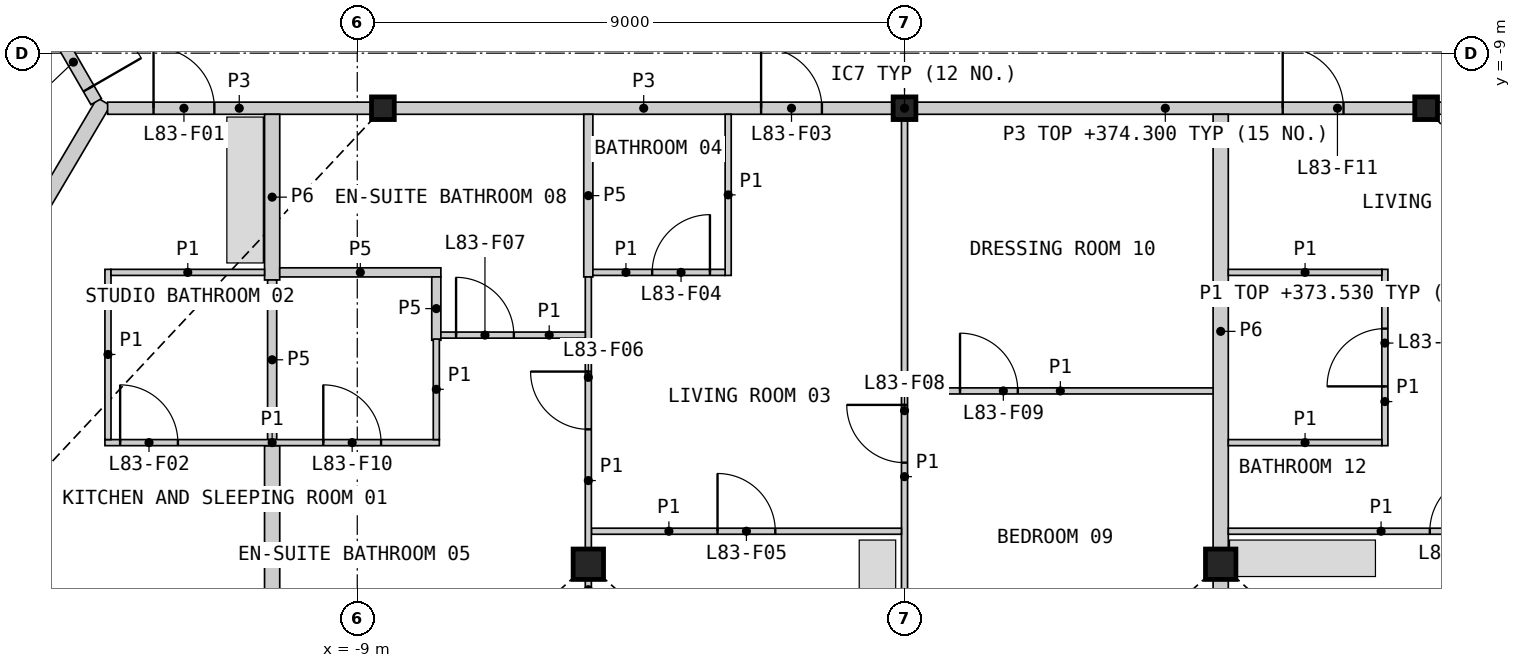
"""IFC4 building model, lengths in metres.
Left out: names, types, materials, properties, quantities, classifications, styles, units other than length and angle.
Written with IfcOpenShell. Run it as: python <this file> out.ifc"""

import sys

from ifc_helpers import new_model, si_unit, direction, frame, frame_2d, origin, origin_2d, place, context, subcontext, project, spatial, rectangle, hollow_rectangle, i_section, extrude, element, fill, save


model = new_model("IFC4")
c1 = context("Model", 3, precision=1e-05, world=origin(), true_north=direction((0.0, 1.0)))
c2 = subcontext(c1, "Body", "Model", "MODEL_VIEW")
j1 = project(units=[si_unit("LENGTHUNIT", "METRE"), si_unit("PLANEANGLEUNIT", "RADIAN")], contexts=[c1])
p1 = place(None, origin())
s1 = spatial("IfcSite", under=j1, at=p1, CompositionType="ELEMENT")
p2 = place(p1, origin())
s2 = spatial("IfcBuilding", under=s1, at=p2, CompositionType="ELEMENT")
p3 = place(p2, frame((0.0, 0.0, 371.2)))
s3 = spatial("IfcBuildingStorey", under=s2, at=p3, CompositionType="ELEMENT", Elevation=371.2)
for number, where, z_axis, x_axis in (
    (1, (-5.2, -17.406, 0.0), (0.0, 0.0, 1.0), (1.0, 0.0, 0.0)),
    (2, (5.2, -17.406, 0.0), (0.0, 0.0, 1.0), (1.0, 0.0, 0.0)),
):
    element("IfcColumn", number, at=place(p3, frame(where, z_axis=z_axis, x_axis=x_axis)), inside=s3, PredefinedType="COLUMN", context=c2, shape_type="SweptSolid", body=[
        extrude(hollow_rectangle(XDim=0.5, YDim=0.5, WallThickness=0.03, at=origin_2d()), origin(), (0.0, 0.0, 1.0), 3.4),
    ])
for number, where, z_axis, x_axis in (
    (3, (-8.578, -9.906, 0.0), (0.0, 0.0, 1.0), (1.0, 0.0, 0.0)),
    (4, (0.0, -9.906, 0.0), (0.0, 0.0, 1.0), (1.0, 0.0, 0.0)),
    (5, (8.578, -9.906, 0.0), (0.0, 0.0, 1.0), (1.0, 0.0, 0.0)),
):
    element("IfcColumn", number, at=place(p3, frame(where, z_axis=z_axis, x_axis=x_axis)), inside=s3, PredefinedType="COLUMN", context=c2, shape_type="SweptSolid", body=[
        extrude(i_section(OverallWidth=0.374, OverallDepth=0.372, WebThickness=0.016, FlangeThickness=0.026, at=origin_2d()), origin(), (0.0, 0.0, 1.0), 3.4),
    ])
p4 = place(p3, frame((-20.351, -21.956, 0.0), z_axis=(0.0, 0.0, 1.0), x_axis=(0.508713003719, 0.860936164793, 0.0)))
e6 = element("IfcWall", 6, at=p4, inside=s3, PredefinedType="PARTITIONING", context=c2, shape_type="SweptSolid", body=[
    extrude(rectangle(XDim=14.122, YDim=0.25, at=frame_2d((7.061, 0.0))), origin(), (0.0, 0.0, 1.0), 2.33),
])
p5 = place(p3, frame((0.197, -9.906, 0.0), z_axis=(0.0, 0.0, 1.0), x_axis=(1.0, 0.0, 0.0)))
e7 = element("IfcWall", 7, at=p5, inside=s3, PredefinedType="PARTITIONING", context=c2, shape_type="SweptSolid", body=[
    extrude(rectangle(XDim=8.185, YDim=0.2, at=frame_2d((4.092, 0.0))), origin(), (0.0, 0.0, 1.0), 3.1),
])
p6 = place(p5, frame((6.023, 0.0, 0.0)))
e8 = element("IfcOpeningElement", 8, at=p6, cuts=e7, PredefinedType="OPENING", context=c2, shape_type="SweptSolid", body=[
    extrude(rectangle(XDim=1.0, YDim=2.1, at=frame_2d((0.5, 1.05))), frame((0.0, 0.11, 0.0), z_axis=(0.0, -1.0, 0.0), x_axis=(1.0, 0.0, 0.0)), (0.0, 0.0, 1.0), 0.22),
])
p7 = place(p3, frame((-8.382, -9.906, 0.0), z_axis=(0.0, 0.0, 1.0), x_axis=(1.0, 0.0, 0.0)))
e9 = element("IfcWall", 9, at=p7, inside=s3, PredefinedType="PARTITIONING", context=c2, shape_type="SweptSolid", body=[
    extrude(rectangle(XDim=8.185, YDim=0.2, at=frame_2d((4.092, 0.0))), origin(), (0.0, 0.0, 1.0), 3.1),
])
p8 = place(p7, frame((6.023, 0.0, 0.0)))
e10 = element("IfcOpeningElement", 10, at=p8, cuts=e9, PredefinedType="OPENING", context=c2, shape_type="SweptSolid", body=[
    extrude(rectangle(XDim=1.0, YDim=2.1, at=frame_2d((0.5, 1.05))), frame((0.0, 0.11, 0.0), z_axis=(0.0, -1.0, 0.0), x_axis=(1.0, 0.0, 0.0)), (0.0, 0.0, 1.0), 0.22),
])
p9 = place(p3, frame((5.2, -17.146, 0.0), z_axis=(0.0, 0.0, 1.0), x_axis=(0.0, 1.0, 0.0)))
e11 = element("IfcWall", 11, at=p9, inside=s3, PredefinedType="PARTITIONING", context=c2, shape_type="SweptSolid", body=[
    extrude(rectangle(XDim=7.14, YDim=0.25, at=frame_2d((3.57, 0.0))), origin(), (0.0, 0.0, 1.0), 2.33),
])
p10 = place(p3, frame((-10.4, -21.828, 0.0), z_axis=(0.0, 0.0, 1.0), x_axis=(0.0, 1.0, 0.0)))
e12 = element("IfcWall", 12, at=p10, inside=s3, PredefinedType="PARTITIONING", context=c2, shape_type="SweptSolid", body=[
    extrude(rectangle(XDim=6.372, YDim=0.25, at=frame_2d((3.186, 0.0))), origin(), (0.0, 0.0, 1.0), 2.33),
])
p11 = place(p3, frame((-13.106, -9.906, 0.0), z_axis=(0.0, 0.0, 1.0), x_axis=(1.0, 0.0, 0.0)))
e13 = element("IfcWall", 13, at=p11, inside=s3, PredefinedType="PARTITIONING", context=c2, shape_type="SweptSolid", body=[
    extrude(rectangle(XDim=4.331, YDim=0.2, at=frame_2d((2.165, 0.0))), origin(), (0.0, 0.0, 1.0), 3.1),
])
p12 = place(p11, frame((0.755, 0.0, 0.0)))
e14 = element("IfcOpeningElement", 14, at=p12, cuts=e13, PredefinedType="OPENING", context=c2, shape_type="SweptSolid", body=[
    extrude(rectangle(XDim=1.0, YDim=2.1, at=frame_2d((0.5, 1.05))), frame((0.0, 0.11, 0.0), z_axis=(0.0, -1.0, 0.0), x_axis=(1.0, 0.0, 0.0)), (0.0, 0.0, 1.0), 0.22),
])
p13 = place(p3, frame((8.775, -9.906, 0.0), z_axis=(0.0, 0.0, 1.0), x_axis=(1.0, 0.0, 0.0)))
e15 = element("IfcWall", 15, at=p13, inside=s3, PredefinedType="PARTITIONING", context=c2, shape_type="SweptSolid", body=[
    extrude(rectangle(XDim=4.331, YDim=0.2, at=frame_2d((2.165, 0.0))), origin(), (0.0, 0.0, 1.0), 3.1),
])
p14 = place(p3, frame((-15.131, -6.614, 0.0), z_axis=(0.0, 0.0, 1.0), x_axis=(0.499967746641, -0.866044024469, 0.0)))
e16 = element("IfcWall", 16, at=p14, inside=s3, PredefinedType="PARTITIONING", context=c2, shape_type="SweptSolid", body=[
    extrude(rectangle(XDim=3.676, YDim=0.2, at=frame_2d((1.838, 0.0))), origin(), (0.0, 0.0, 1.0), 3.1),
])
p15 = place(p14, frame((2.426, 0.0, 0.0)))
e17 = element("IfcOpeningElement", 17, at=p15, cuts=e16, PredefinedType="OPENING", context=c2, shape_type="SweptSolid", body=[
    extrude(rectangle(XDim=1.0, YDim=2.1, at=frame_2d((0.5, 1.05))), frame((0.0, 0.11, 0.0), z_axis=(0.0, -1.0, 0.0), x_axis=(1.0, 0.0, 0.0)), (0.0, 0.0, 1.0), 0.22),
])
p16 = place(p3, frame((-10.4, -12.731, 0.0), z_axis=(0.0, 0.0, 1.0), x_axis=(0.0, 1.0, 0.0)))
e18 = element("IfcWall", 18, at=p16, inside=s3, PredefinedType="PARTITIONING", context=c2, shape_type="SweptSolid", body=[
    extrude(rectangle(XDim=2.725, YDim=0.25, at=frame_2d((1.363, 0.0))), origin(), (0.0, 0.0, 1.0), 2.33),
])
p17 = place(p3, frame((5.2, -17.983, 0.0), z_axis=(0.0, 0.0, 1.0), x_axis=(0.0, 1.0, 0.0)))
e19 = element("IfcWall", 19, at=p17, inside=s3, PredefinedType="PARTITIONING", context=c2, shape_type="SweptSolid", body=[
    extrude(rectangle(XDim=0.318, YDim=0.25, at=frame_2d((0.159, 0.0))), origin(), (0.0, 0.0, 1.0), 2.33),
])
p18 = place(p3, frame((-10.4, -15.356, 0.0), z_axis=(0.0, 0.0, 1.0), x_axis=(0.0, 1.0, 0.0)))
e20 = element("IfcWall", 20, at=p18, inside=s3, PredefinedType="PLUMBINGWALL", context=c2, shape_type="SweptSolid", body=[
    extrude(rectangle(XDim=2.625, YDim=0.15, at=frame_2d((1.312, 0.0))), origin(), (0.0, 0.0, 1.0), 2.33),
])
p19 = place(p3, frame((-5.2, -12.681, 0.0), z_axis=(0.0, 0.0, 1.0), x_axis=(0.0, 1.0, 0.0)))
e21 = element("IfcWall", 21, at=p19, inside=s3, PredefinedType="PLUMBINGWALL", context=c2, shape_type="SweptSolid", body=[
    extrude(rectangle(XDim=2.675, YDim=0.15, at=frame_2d((1.337, 0.0))), origin(), (0.0, 0.0, 1.0), 2.33),
])
p20 = place(p3, frame((-10.275, -12.606, 0.0), z_axis=(0.0, 0.0, 1.0), x_axis=(1.0, 0.0, 0.0)))
e22 = element("IfcWall", 22, at=p20, inside=s3, PredefinedType="PLUMBINGWALL", context=c2, shape_type="SweptSolid", body=[
    extrude(rectangle(XDim=2.65, YDim=0.15, at=frame_2d((1.325, 0.0))), origin(), (0.0, 0.0, 1.0), 2.33),
])
p21 = place(p3, frame((-7.7, -13.722, 0.0), z_axis=(0.0, 0.0, 1.0), x_axis=(0.0, 1.0, 0.0)))
e23 = element("IfcWall", 23, at=p21, inside=s3, PredefinedType="PLUMBINGWALL", context=c2, shape_type="SweptSolid", body=[
    extrude(rectangle(XDim=1.042, YDim=0.15, at=frame_2d((0.521, 0.0))), origin(), (0.0, 0.0, 1.0), 2.33),
])
p22 = place(p3, frame((0.0, -21.828, 0.0), z_axis=(0.0, 0.0, 1.0), x_axis=(0.0, 1.0, 0.0)))
e24 = element("IfcWall", 24, at=p22, inside=s3, PredefinedType="PARTITIONING", context=c2, shape_type="SweptSolid", body=[
    extrude(rectangle(XDim=11.725, YDim=0.1, at=frame_2d((5.863, 0.0))), origin(), (0.0, 0.0, 1.0), 2.33),
])
p23 = place(p22, frame((6.093, 0.0, 0.0)))
e25 = element("IfcOpeningElement", 25, at=p23, cuts=e24, PredefinedType="OPENING", context=c2, shape_type="SweptSolid", body=[
    extrude(rectangle(XDim=0.95, YDim=2.1, at=frame_2d((0.475, 1.05))), frame((0.0, 0.06, 0.0), z_axis=(0.0, -1.0, 0.0), x_axis=(1.0, 0.0, 0.0)), (0.0, 0.0, 1.0), 0.12),
])
p24 = place(p3, frame((-13.15, -15.406, 0.0), z_axis=(0.0, 0.0, 1.0), x_axis=(1.0, 0.0, 0.0)))
e26 = element("IfcWall", 26, at=p24, inside=s3, PredefinedType="PARTITIONING", context=c2, shape_type="SweptSolid", body=[
    extrude(rectangle(XDim=5.5, YDim=0.1, at=frame_2d((2.75, 0.0))), origin(), (0.0, 0.0, 1.0), 2.33),
])
p25 = place(p24, frame((0.25, 0.0, 0.0)))
e27 = element("IfcOpeningElement", 27, at=p25, cuts=e26, PredefinedType="OPENING", context=c2, shape_type="SweptSolid", body=[
    extrude(rectangle(XDim=0.95, YDim=2.1, at=frame_2d((0.475, 1.05))), frame((0.0, 0.06, 0.0), z_axis=(0.0, -1.0, 0.0), x_axis=(1.0, 0.0, 0.0)), (0.0, 0.0, 1.0), 0.12),
])
p26 = place(p24, frame((3.591, 0.0, 0.0)))
e28 = element("IfcOpeningElement", 28, at=p26, cuts=e26, PredefinedType="OPENING", context=c2, shape_type="SweptSolid", body=[
    extrude(rectangle(XDim=0.95, YDim=2.1, at=frame_2d((0.475, 1.05))), frame((0.0, 0.06, 0.0), z_axis=(0.0, -1.0, 0.0), x_axis=(1.0, 0.0, 0.0)), (0.0, 0.0, 1.0), 0.12),
])
p27 = place(p3, frame((-5.15, -16.863, 0.0), z_axis=(0.0, 0.0, 1.0), x_axis=(1.0, 0.0, 0.0)))
e29 = element("IfcWall", 29, at=p27, inside=s3, PredefinedType="PARTITIONING", context=c2, shape_type="SweptSolid", body=[
    extrude(rectangle(XDim=5.1, YDim=0.1, at=frame_2d((2.55, 0.0))), origin(), (0.0, 0.0, 1.0), 2.33),
])
p28 = place(p27, frame((2.075, 0.0, 0.0)))
e30 = element("IfcOpeningElement", 30, at=p28, cuts=e29, PredefinedType="OPENING", context=c2, shape_type="SweptSolid", body=[
    extrude(rectangle(XDim=0.95, YDim=2.1, at=frame_2d((0.475, 1.05))), frame((0.0, 0.06, 0.0), z_axis=(0.0, -1.0, 0.0), x_axis=(1.0, 0.0, 0.0)), (0.0, 0.0, 1.0), 0.12),
])
p29 = place(p3, frame((5.325, -16.863, 0.0), z_axis=(0.0, 0.0, 1.0), x_axis=(1.0, 0.0, 0.0)))
e31 = element("IfcWall", 31, at=p29, inside=s3, PredefinedType="PARTITIONING", context=c2, shape_type="SweptSolid", body=[
    extrude(rectangle(XDim=5.025, YDim=0.1, at=frame_2d((2.513, 0.0))), origin(), (0.0, 0.0, 1.0), 2.33),
])
p30 = place(p29, frame((3.314, 0.0, 0.0)))
e32 = element("IfcOpeningElement", 32, at=p30, cuts=e31, PredefinedType="OPENING", context=c2, shape_type="SweptSolid", body=[
    extrude(rectangle(XDim=0.95, YDim=2.1, at=frame_2d((0.475, 1.05))), frame((0.0, 0.06, 0.0), z_axis=(0.0, -1.0, 0.0), x_axis=(1.0, 0.0, 0.0)), (0.0, 0.0, 1.0), 0.12),
])
p31 = place(p3, frame((0.05, -14.555, 0.0), z_axis=(0.0, 0.0, 1.0), x_axis=(1.0, 0.0, 0.0)))
e33 = element("IfcWall", 33, at=p31, inside=s3, PredefinedType="PARTITIONING", context=c2, shape_type="SweptSolid", body=[
    extrude(rectangle(XDim=5.025, YDim=0.1, at=frame_2d((2.512, 0.0))), origin(), (0.0, 0.0, 1.0), 2.33),
])
p32 = place(p31, frame((0.863, 0.0, 0.0)))
e34 = element("IfcOpeningElement", 34, at=p32, cuts=e33, PredefinedType="OPENING", context=c2, shape_type="SweptSolid", body=[
    extrude(rectangle(XDim=0.95, YDim=2.1, at=frame_2d((0.475, 1.05))), frame((0.0, 0.06, 0.0), z_axis=(0.0, -1.0, 0.0), x_axis=(1.0, 0.0, 0.0)), (0.0, 0.0, 1.0), 0.12),
])
p33 = place(p3, frame((-5.2, -17.146, 0.0), z_axis=(0.0, 0.0, 1.0), x_axis=(0.0, 1.0, 0.0)))
e35 = element("IfcWall", 35, at=p33, inside=s3, PredefinedType="PARTITIONING", context=c2, shape_type="SweptSolid", body=[
    extrude(rectangle(XDim=4.465, YDim=0.1, at=frame_2d((2.232, 0.0))), origin(), (0.0, 0.0, 1.0), 2.33),
])
p34 = place(p33, frame((1.958, 0.0, 0.0)))
e36 = element("IfcOpeningElement", 36, at=p34, cuts=e35, PredefinedType="OPENING", context=c2, shape_type="SweptSolid", body=[
    extrude(rectangle(XDim=0.95, YDim=2.1, at=frame_2d((0.475, 1.05))), frame((0.0, 0.06, 0.0), z_axis=(0.0, -1.0, 0.0), x_axis=(1.0, 0.0, 0.0)), (0.0, 0.0, 1.0), 0.12),
])
p35 = place(p3, frame((-13.1, -15.356, 0.0), z_axis=(0.0, 0.0, 1.0), x_axis=(0.0, 1.0, 0.0)))
e37 = element("IfcWall", 37, at=p35, inside=s3, PredefinedType="PARTITIONING", context=c2, shape_type="SweptSolid", body=[
    extrude(rectangle(XDim=2.8, YDim=0.1, at=frame_2d((1.4, 0.0))), origin(), (0.0, 0.0, 1.0), 2.33),
])
p36 = place(p3, frame((7.9, -15.456, 0.0), z_axis=(0.0, 0.0, 1.0), x_axis=(0.0, 1.0, 0.0)))
e38 = element("IfcWall", 38, at=p36, inside=s3, PredefinedType="PARTITIONING", context=c2, shape_type="SweptSolid", body=[
    extrude(rectangle(XDim=2.9, YDim=0.1, at=frame_2d((1.45, 0.0))), origin(), (0.0, 0.0, 1.0), 2.33),
])
p37 = place(p36, frame((0.975, 0.0, 0.0)))
e39 = element("IfcOpeningElement", 39, at=p37, cuts=e38, PredefinedType="OPENING", context=c2, shape_type="SweptSolid", body=[
    extrude(rectangle(XDim=0.95, YDim=2.1, at=frame_2d((0.475, 1.05))), frame((0.0, 0.06, 0.0), z_axis=(0.0, -1.0, 0.0), x_axis=(1.0, 0.0, 0.0)), (0.0, 0.0, 1.0), 0.12),
])
p38 = place(p3, frame((-13.05, -12.606, 0.0), z_axis=(0.0, 0.0, 1.0), x_axis=(1.0, 0.0, 0.0)))
e40 = element("IfcWall", 40, at=p38, inside=s3, PredefinedType="PARTITIONING", context=c2, shape_type="SweptSolid", body=[
    extrude(rectangle(XDim=2.525, YDim=0.1, at=frame_2d((1.263, 0.0))), origin(), (0.0, 0.0, 1.0), 2.33),
])
p39 = place(p3, frame((-2.9, -12.656, 0.0), z_axis=(0.0, 0.0, 1.0), x_axis=(0.0, 1.0, 0.0)))
e41 = element("IfcWall", 41, at=p39, inside=s3, PredefinedType="PARTITIONING", context=c2, shape_type="SweptSolid", body=[
    extrude(rectangle(XDim=2.65, YDim=0.1, at=frame_2d((1.325, 0.0))), origin(), (0.0, 0.0, 1.0), 2.33),
])
for number, where, z_axis, x_axis in (
    (42, (5.325, -12.606, 0.0), (0.0, 0.0, 1.0), (1.0, 0.0, 0.0)),
    (43, (5.325, -15.406, 0.0), (0.0, 0.0, 1.0), (1.0, 0.0, 0.0)),
):
    element("IfcWall", number, at=place(p3, frame(where, z_axis=z_axis, x_axis=x_axis)), inside=s3, PredefinedType="PARTITIONING", context=c2, shape_type="SweptSolid", body=[
        extrude(rectangle(XDim=2.525, YDim=0.1, at=frame_2d((1.263, 0.0))), origin(), (0.0, 0.0, 1.0), 2.33),
    ])
p40 = place(p3, frame((-7.625, -13.637, 0.0), z_axis=(0.0, 0.0, 1.0), x_axis=(1.0, 0.0, 0.0)))
e44 = element("IfcWall", 44, at=p40, inside=s3, PredefinedType="PARTITIONING", context=c2, shape_type="SweptSolid", body=[
    extrude(rectangle(XDim=2.375, YDim=0.1, at=frame_2d((1.188, 0.0))), origin(), (0.0, 0.0, 1.0), 2.33),
])
p41 = place(p40, frame((0.25, 0.0, 0.0)))
e45 = element("IfcOpeningElement", 45, at=p41, cuts=e44, PredefinedType="OPENING", context=c2, shape_type="SweptSolid", body=[
    extrude(rectangle(XDim=0.95, YDim=2.1, at=frame_2d((0.475, 1.05))), frame((0.0, 0.06, 0.0), z_axis=(0.0, -1.0, 0.0), x_axis=(1.0, 0.0, 0.0)), (0.0, 0.0, 1.0), 0.12),
])
p42 = place(p3, frame((-5.125, -12.606, 0.0), z_axis=(0.0, 0.0, 1.0), x_axis=(1.0, 0.0, 0.0)))
e46 = element("IfcWall", 46, at=p42, inside=s3, PredefinedType="PARTITIONING", context=c2, shape_type="SweptSolid", body=[
    extrude(rectangle(XDim=2.175, YDim=0.1, at=frame_2d((1.087, 0.0))), origin(), (0.0, 0.0, 1.0), 2.33),
])
p43 = place(p42, frame((0.975, 0.0, 0.0)))
e47 = element("IfcOpeningElement", 47, at=p43, cuts=e46, PredefinedType="OPENING", context=c2, shape_type="SweptSolid", body=[
    extrude(rectangle(XDim=0.95, YDim=2.1, at=frame_2d((0.475, 1.05))), frame((0.0, 0.06, 0.0), z_axis=(0.0, -1.0, 0.0), x_axis=(1.0, 0.0, 0.0)), (0.0, 0.0, 1.0), 0.12),
])
p44 = place(p3, frame((-7.7, -15.356, 0.0), z_axis=(0.0, 0.0, 1.0), x_axis=(0.0, 1.0, 0.0)))
e48 = element("IfcWall", 48, at=p44, inside=s3, PredefinedType="PARTITIONING", context=c2, shape_type="SweptSolid", body=[
    extrude(rectangle(XDim=1.654, YDim=0.1, at=frame_2d((0.827, 0.0))), origin(), (0.0, 0.0, 1.0), 2.33),
])
p45 = place(p3, frame((-5.2, -17.983, 0.0), z_axis=(0.0, 0.0, 1.0), x_axis=(0.0, 1.0, 0.0)))
e49 = element("IfcWall", 49, at=p45, inside=s3, PredefinedType="PARTITIONING", context=c2, shape_type="SweptSolid", body=[
    extrude(rectangle(XDim=0.318, YDim=0.1, at=frame_2d((0.159, 0.0))), origin(), (0.0, 0.0, 1.0), 2.33),
])
p46 = place(p12, origin())
e50 = element("IfcDoor", 50, at=p46, inside=s3, OperationType="SINGLE_SWING_LEFT", PredefinedType="DOOR", context=c2, shape_type="SweptSolid", body=[
    extrude(rectangle(XDim=1.0, YDim=2.1, at=frame_2d((0.5, 1.05))), frame((0.0, 0.025, 0.0), z_axis=(0.0, -1.0, 0.0), x_axis=(1.0, 0.0, 0.0)), (0.0, 0.0, 1.0), 0.05),
])
fill(e14, e50)
p47 = place(p25, origin())
e51 = element("IfcDoor", 51, at=p47, inside=s3, OperationType="SINGLE_SWING_LEFT", PredefinedType="DOOR", context=c2, shape_type="SweptSolid", body=[
    extrude(rectangle(XDim=0.95, YDim=2.1, at=frame_2d((0.475, 1.05))), frame((0.0, 0.025, 0.0), z_axis=(0.0, -1.0, 0.0), x_axis=(1.0, 0.0, 0.0)), (0.0, 0.0, 1.0), 0.05),
])
fill(e27, e51)
p48 = place(p8, origin())
e52 = element("IfcDoor", 52, at=p48, inside=s3, OperationType="SINGLE_SWING_LEFT", PredefinedType="DOOR", context=c2, shape_type="SweptSolid", body=[
    extrude(rectangle(XDim=1.0, YDim=2.1, at=frame_2d((0.5, 1.05))), frame((0.0, 0.025, 0.0), z_axis=(0.0, -1.0, 0.0), x_axis=(1.0, 0.0, 0.0)), (0.0, 0.0, 1.0), 0.05),
])
fill(e10, e52)
p49 = place(p43, origin())
e53 = element("IfcDoor", 53, at=p49, inside=s3, OperationType="SINGLE_SWING_RIGHT", PredefinedType="DOOR", context=c2, shape_type="SweptSolid", body=[
    extrude(rectangle(XDim=0.95, YDim=2.1, at=frame_2d((0.475, 1.05))), frame((0.0, 0.025, 0.0), z_axis=(0.0, -1.0, 0.0), x_axis=(1.0, 0.0, 0.0)), (0.0, 0.0, 1.0), 0.05),
])
fill(e47, e53)
p50 = place(p28, origin())
e54 = element("IfcDoor", 54, at=p50, inside=s3, OperationType="SINGLE_SWING_LEFT", PredefinedType="DOOR", context=c2, shape_type="SweptSolid", body=[
    extrude(rectangle(XDim=0.95, YDim=2.1, at=frame_2d((0.475, 1.05))), frame((0.0, 0.025, 0.0), z_axis=(0.0, -1.0, 0.0), x_axis=(1.0, 0.0, 0.0)), (0.0, 0.0, 1.0), 0.05),
])
fill(e30, e54)
p51 = place(p34, origin())
e55 = element("IfcDoor", 55, at=p51, inside=s3, OperationType="SINGLE_SWING_RIGHT", PredefinedType="DOOR", context=c2, shape_type="SweptSolid", body=[
    extrude(rectangle(XDim=0.95, YDim=2.1, at=frame_2d((0.475, 1.05))), frame((0.0, 0.025, 0.0), z_axis=(0.0, -1.0, 0.0), x_axis=(1.0, 0.0, 0.0)), (0.0, 0.0, 1.0), 0.05),
])
fill(e36, e55)
p52 = place(p41, origin())
e56 = element("IfcDoor", 56, at=p52, inside=s3, OperationType="SINGLE_SWING_LEFT", PredefinedType="DOOR", context=c2, shape_type="SweptSolid", body=[
    extrude(rectangle(XDim=0.95, YDim=2.1, at=frame_2d((0.475, 1.05))), frame((0.0, 0.025, 0.0), z_axis=(0.0, -1.0, 0.0), x_axis=(1.0, 0.0, 0.0)), (0.0, 0.0, 1.0), 0.05),
])
fill(e45, e56)
p53 = place(p23, origin())
e57 = element("IfcDoor", 57, at=p53, inside=s3, OperationType="SINGLE_SWING_RIGHT", PredefinedType="DOOR", context=c2, shape_type="SweptSolid", body=[
    extrude(rectangle(XDim=0.95, YDim=2.1, at=frame_2d((0.475, 1.05))), frame((0.0, 0.025, 0.0), z_axis=(0.0, -1.0, 0.0), x_axis=(1.0, 0.0, 0.0)), (0.0, 0.0, 1.0), 0.05),
])
fill(e25, e57)
p54 = place(p32, origin())
e58 = element("IfcDoor", 58, at=p54, inside=s3, OperationType="SINGLE_SWING_LEFT", PredefinedType="DOOR", context=c2, shape_type="SweptSolid", body=[
    extrude(rectangle(XDim=0.95, YDim=2.1, at=frame_2d((0.475, 1.05))), frame((0.0, 0.025, 0.0), z_axis=(0.0, -1.0, 0.0), x_axis=(1.0, 0.0, 0.0)), (0.0, 0.0, 1.0), 0.05),
])
fill(e34, e58)
p55 = place(p26, origin())
e59 = element("IfcDoor", 59, at=p55, inside=s3, OperationType="SINGLE_SWING_LEFT", PredefinedType="DOOR", context=c2, shape_type="SweptSolid", body=[
    extrude(rectangle(XDim=0.95, YDim=2.1, at=frame_2d((0.475, 1.05))), frame((0.0, 0.025, 0.0), z_axis=(0.0, -1.0, 0.0), x_axis=(1.0, 0.0, 0.0)), (0.0, 0.0, 1.0), 0.05),
])
fill(e28, e59)
p56 = place(p6, origin())
e60 = element("IfcDoor", 60, at=p56, inside=s3, OperationType="SINGLE_SWING_LEFT", PredefinedType="DOOR", context=c2, shape_type="SweptSolid", body=[
    extrude(rectangle(XDim=1.0, YDim=2.1, at=frame_2d((0.5, 1.05))), frame((0.0, 0.025, 0.0), z_axis=(0.0, -1.0, 0.0), x_axis=(1.0, 0.0, 0.0)), (0.0, 0.0, 1.0), 0.05),
])
fill(e8, e60)
p57 = place(p37, origin())
e61 = element("IfcDoor", 61, at=p57, inside=s3, OperationType="SINGLE_SWING_LEFT", PredefinedType="DOOR", context=c2, shape_type="SweptSolid", body=[
    extrude(rectangle(XDim=0.95, YDim=2.1, at=frame_2d((0.475, 1.05))), frame((0.0, 0.025, 0.0), z_axis=(0.0, -1.0, 0.0), x_axis=(1.0, 0.0, 0.0)), (0.0, 0.0, 1.0), 0.05),
])
fill(e39, e61)
p58 = place(p30, origin())
e62 = element("IfcDoor", 62, at=p58, inside=s3, OperationType="SINGLE_SWING_RIGHT", PredefinedType="DOOR", context=c2, shape_type="SweptSolid", body=[
    extrude(rectangle(XDim=0.95, YDim=2.1, at=frame_2d((0.475, 1.05))), frame((0.0, 0.025, 0.0), z_axis=(0.0, -1.0, 0.0), x_axis=(1.0, 0.0, 0.0)), (0.0, 0.0, 1.0), 0.05),
])
fill(e32, e62)
p59 = place(p15, origin())
e63 = element("IfcDoor", 63, at=p59, inside=s3, OperationType="SINGLE_SWING_RIGHT", PredefinedType="DOOR", context=c2, shape_type="SweptSolid", body=[
    extrude(rectangle(XDim=1.0, YDim=2.1, at=frame_2d((0.5, 1.05))), frame((0.0, 0.025, 0.0), z_axis=(0.0, -1.0, 0.0), x_axis=(1.0, 0.0, 0.0)), (0.0, 0.0, 1.0), 0.05),
])
fill(e17, e63)
save(model, sys.argv[1])
